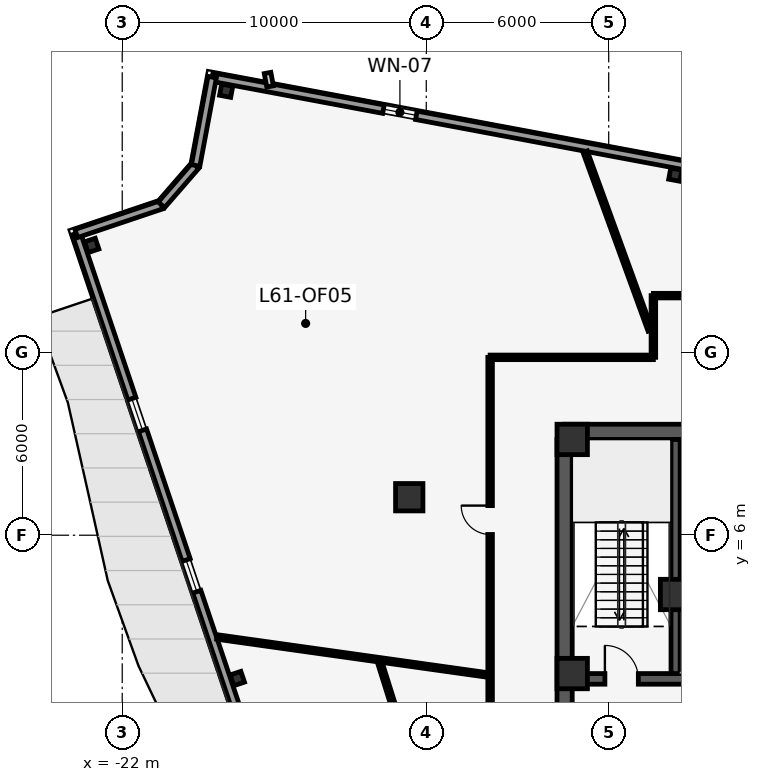
"""IFC4 building model, lengths in metres.
Left out: names, types, materials, properties, quantities, classifications, styles, units other than length and angle.
Written with IfcOpenShell. Run it as: python <this file> out.ifc"""

import sys

from ifc_helpers import new_model, si_unit, direction, frame, frame_2d, origin, origin_2d, place, context, subcontext, project, spatial, rectangle, i_section, extrude, element, fill, save


model = new_model("IFC4")
c1 = context("Model", 3, precision=1e-05, world=origin(), true_north=direction((0.0, 1.0)))
c2 = subcontext(c1, "Body", "Model", "MODEL_VIEW")
j1 = project(units=[si_unit("LENGTHUNIT", "METRE"), si_unit("PLANEANGLEUNIT", "RADIAN")], contexts=[c1])
p1 = place(None, origin())
s1 = spatial("IfcSite", under=j1, at=p1, CompositionType="ELEMENT")
p2 = place(p1, origin())
s2 = spatial("IfcBuilding", under=s1, at=p2, CompositionType="ELEMENT")
p3 = place(p2, frame((0.0, 0.0, 260.9)))
s3 = spatial("IfcBuildingStorey", under=s2, at=p3, CompositionType="ELEMENT", Elevation=260.9)
p4 = place(p3, frame((-7.45, 9.4, 0.0), z_axis=(0.0, 0.0, 1.0), x_axis=(1.0, 0.0, 0.0)))
e1 = element("IfcWall", 1, at=p4, inside=s3, PredefinedType="SHEAR", context=c2, shape_type="SweptSolid", body=[
    extrude(rectangle(XDim=14.9, YDim=0.5, at=frame_2d((7.45, 0.0))), origin(), (0.0, 0.0, 1.0), 4.35),
])
p5 = place(p4, frame((6.9, 0.0, 0.0)))
e2 = element("IfcOpeningElement", 2, at=p5, cuts=e1, PredefinedType="OPENING", context=c2, shape_type="SweptSolid", body=[
    extrude(rectangle(XDim=1.1, YDim=2.15, at=frame_2d((0.55, 1.075))), frame((0.0, 0.26, 0.0), z_axis=(0.0, -1.0, 0.0), x_axis=(1.0, 0.0, 0.0)), (0.0, 0.0, 1.0), 0.52),
])
p6 = place(p4, frame((4.23, 0.0, 0.0)))
e3 = element("IfcOpeningElement", 3, at=p6, cuts=e1, PredefinedType="OPENING", context=c2, shape_type="SweptSolid", body=[
    extrude(rectangle(XDim=0.88, YDim=2.15, at=frame_2d((0.44, 1.075))), frame((0.0, 0.26, 0.0), z_axis=(0.0, -1.0, 0.0), x_axis=(1.0, 0.0, 0.0)), (0.0, 0.0, 1.0), 0.52),
])
p7 = place(p4, frame((9.79, 0.0, 0.0)))
e4 = element("IfcOpeningElement", 4, at=p7, cuts=e1, PredefinedType="OPENING", context=c2, shape_type="SweptSolid", body=[
    extrude(rectangle(XDim=0.88, YDim=2.15, at=frame_2d((0.44, 1.075))), frame((0.0, 0.26, 0.0), z_axis=(0.0, -1.0, 0.0), x_axis=(1.0, 0.0, 0.0)), (0.0, 0.0, 1.0), 0.52),
])
p8 = place(p3, frame((-7.2, 1.275, 0.0), z_axis=(0.0, 0.0, 1.0), x_axis=(1.0, 0.0, 0.0)))
e5 = element("IfcWall", 5, at=p8, inside=s3, PredefinedType="SHEAR", context=c2, shape_type="SweptSolid", body=[
    extrude(rectangle(XDim=14.4, YDim=0.35, at=frame_2d((7.2, 0.0))), origin(), (0.0, 0.0, 1.0), 4.35),
])
p9 = place(p8, frame((3.795, 0.0, 0.0)))
e6 = element("IfcOpeningElement", 6, at=p9, cuts=e5, PredefinedType="OPENING", context=c2, shape_type="SweptSolid", body=[
    extrude(rectangle(XDim=1.25, YDim=2.25, at=frame_2d((0.625, 1.125))), frame((0.0, 0.185, 0.0), z_axis=(0.0, -1.0, 0.0), x_axis=(1.0, 0.0, 0.0)), (0.0, 0.0, 1.0), 0.37),
])
p10 = place(p8, frame((9.355, 0.0, 0.0)))
e7 = element("IfcOpeningElement", 7, at=p10, cuts=e5, PredefinedType="OPENING", context=c2, shape_type="SweptSolid", body=[
    extrude(rectangle(XDim=1.25, YDim=2.25, at=frame_2d((0.625, 1.125))), frame((0.0, 0.185, 0.0), z_axis=(0.0, -1.0, 0.0), x_axis=(1.0, 0.0, 0.0)), (0.0, 0.0, 1.0), 0.37),
])
p11 = place(p8, frame((1.075, 0.0, 0.0)))
e8 = element("IfcOpeningElement", 8, at=p11, cuts=e5, PredefinedType="OPENING", context=c2, shape_type="SweptSolid", body=[
    extrude(rectangle(XDim=1.1, YDim=2.15, at=frame_2d((0.55, 1.075))), frame((0.0, 0.185, 0.0), z_axis=(0.0, -1.0, 0.0), x_axis=(1.0, 0.0, 0.0)), (0.0, 0.0, 1.0), 0.37),
])
p12 = place(p8, frame((12.225, 0.0, 0.0)))
e9 = element("IfcOpeningElement", 9, at=p12, cuts=e5, PredefinedType="OPENING", context=c2, shape_type="SweptSolid", body=[
    extrude(rectangle(XDim=1.1, YDim=2.15, at=frame_2d((0.55, 1.075))), frame((0.0, 0.185, 0.0), z_axis=(0.0, -1.0, 0.0), x_axis=(1.0, 0.0, 0.0)), (0.0, 0.0, 1.0), 0.37),
])
p13 = place(p3, frame((-3.8, 1.45, 0.0), z_axis=(0.0, 0.0, 1.0), x_axis=(0.0, 1.0, 0.0)))
e10 = element("IfcWall", 10, at=p13, inside=s3, PredefinedType="SHEAR", context=c2, shape_type="SweptSolid", body=[
    extrude(rectangle(XDim=7.7, YDim=0.3, at=frame_2d((3.85, 0.0))), origin(), (0.0, 0.0, 1.0), 4.35),
])
p14 = place(p3, frame((-7.45, 0.1, 0.0), z_axis=(0.0, 0.0, 1.0), x_axis=(0.0, 1.0, 0.0)))
e11 = element("IfcWall", 11, at=p14, inside=s3, PredefinedType="SHEAR", context=c2, shape_type="SweptSolid", body=[
    extrude(rectangle(XDim=9.05, YDim=0.5, at=frame_2d((4.525, 0.0))), origin(), (0.0, 0.0, 1.0), 4.35),
])
for number, where, z_axis, x_axis in (
    (12, (-7.2, 9.15, 0.0), (0.0, 0.0, 1.0), (1.0, 0.0, 0.0)),
    (13, (-7.2, 1.45, 0.0), (0.0, 0.0, 1.0), (1.0, 0.0, 0.0)),
    (14, (-3.8, 4.05, 0.0), (0.0, 0.0, 1.0), (1.0, 0.0, 0.0)),
):
    element("IfcColumn", number, at=place(p3, frame(where, z_axis=z_axis, x_axis=x_axis)), inside=s3, PredefinedType="COLUMN", context=c2, shape_type="SweptSolid", body=[
        extrude(rectangle(XDim=1.0, YDim=1.0, at=origin_2d()), origin(), (0.0, 0.0, 1.0), 4.6),
    ])
p15 = place(p3, frame((-12.56, 7.25, 0.0), z_axis=(0.0, 0.0, 1.0), x_axis=(1.0, 0.0, 0.0)))
e15 = element("IfcColumn", 15, at=p15, inside=s3, PredefinedType="COLUMN", context=c2, shape_type="SweptSolid", body=[
    extrude(rectangle(XDim=0.9, YDim=0.9, at=origin_2d()), origin(), (0.0, 0.0, 1.0), 4.6),
])
for number, where, z_axis, x_axis in (
    (16, (-23.004, 15.531, 0.0), (0.0, 0.0, 1.0), (-0.319, 0.948, 0.0)),
    (17, (-18.215, 1.286, 0.0), (0.0, 0.0, 1.0), (-0.319, 0.948, 0.0)),
    (18, (-3.809, 17.859, 0.0), (0.0, 0.0, 1.0), (-0.983, 0.184, 0.0)),
    (19, (-18.582, 20.619, 0.0), (0.0, 0.0, 1.0), (-0.983, 0.184, 0.0)),
):
    element("IfcColumn", number, at=place(p3, frame(where, z_axis=z_axis, x_axis=x_axis)), inside=s3, PredefinedType="COLUMN", context=c2, shape_type="SweptSolid", body=[
        extrude(i_section(OverallWidth=0.373, OverallDepth=0.373, WebThickness=0.016, FlangeThickness=0.026, at=origin_2d()), origin(), (0.0, 0.0, 1.0), 4.6),
    ])
p16 = place(p3, frame((-19.042, 21.066, 0.0), z_axis=(0.0, 0.0, 1.0), x_axis=(0.982948140881, -0.183882985453, 0.0)))
e20 = element("IfcWall", 20, at=p16, inside=s3, PredefinedType="STANDARD", context=c2, shape_type="SweptSolid", body=[
    extrude(rectangle(XDim=46.163, YDim=0.28, at=frame_2d((23.081, 0.0))), origin(), (0.0, 0.0, 1.0), 4.35),
])
p17 = place(p16, frame((5.731, 0.0, 0.85)))
e21 = element("IfcOpeningElement", 21, at=p17, cuts=e20, PredefinedType="OPENING", context=c2, shape_type="SweptSolid", body=[
    extrude(rectangle(XDim=1.1, YDim=2.15, at=frame_2d((0.55, 1.075))), frame((0.0, 0.15, 0.0), z_axis=(0.0, -1.0, 0.0), x_axis=(1.0, 0.0, 0.0)), (0.0, 0.0, 1.0), 0.3),
])
p18 = place(p16, frame((33.731, 0.0, 0.85)))
e22 = element("IfcOpeningElement", 22, at=p18, cuts=e20, PredefinedType="OPENING", context=c2, shape_type="SweptSolid", body=[
    extrude(rectangle(XDim=1.1, YDim=2.15, at=frame_2d((0.55, 1.075))), frame((0.0, 0.15, 0.0), z_axis=(0.0, -1.0, 0.0), x_axis=(1.0, 0.0, 0.0)), (0.0, 0.0, 1.0), 0.3),
])
p19 = place(p16, frame((39.331, 0.0, 0.85)))
e23 = element("IfcOpeningElement", 23, at=p19, cuts=e20, PredefinedType="OPENING", context=c2, shape_type="SweptSolid", body=[
    extrude(rectangle(XDim=1.1, YDim=2.15, at=frame_2d((0.55, 1.075))), frame((0.0, 0.15, 0.0), z_axis=(0.0, -1.0, 0.0), x_axis=(1.0, 0.0, 0.0)), (0.0, 0.0, 1.0), 0.3),
])
p20 = place(p3, frame((-8.79, -27.828, 0.0), z_axis=(0.0, 0.0, 1.0), x_axis=(-0.318898365887, 0.947788917552, 0.0)))
e24 = element("IfcWall", 24, at=p20, inside=s3, PredefinedType="STANDARD", context=c2, shape_type="SweptSolid", body=[
    extrude(rectangle(XDim=46.163, YDim=0.28, at=frame_2d((23.081, 0.0))), origin(), (0.0, 0.0, 1.0), 4.35),
])
p21 = place(p20, frame((22.281, 0.0, 0.0)))
e25 = element("IfcOpeningElement", 25, at=p21, cuts=e24, PredefinedType="OPENING", context=c2, shape_type="SweptSolid", body=[
    extrude(rectangle(XDim=1.6, YDim=2.2, at=frame_2d((0.8, 1.1))), frame((0.0, 0.15, 0.0), z_axis=(0.0, -1.0, 0.0), x_axis=(1.0, 0.0, 0.0)), (0.0, 0.0, 1.0), 0.3),
])
p22 = place(p20, frame((5.731, 0.0, 0.85)))
e26 = element("IfcOpeningElement", 26, at=p22, cuts=e24, PredefinedType="OPENING", context=c2, shape_type="SweptSolid", body=[
    extrude(rectangle(XDim=1.1, YDim=2.15, at=frame_2d((0.55, 1.075))), frame((0.0, 0.15, 0.0), z_axis=(0.0, -1.0, 0.0), x_axis=(1.0, 0.0, 0.0)), (0.0, 0.0, 1.0), 0.3),
])
p23 = place(p20, frame((11.331, 0.0, 0.85)))
e27 = element("IfcOpeningElement", 27, at=p23, cuts=e24, PredefinedType="OPENING", context=c2, shape_type="SweptSolid", body=[
    extrude(rectangle(XDim=1.1, YDim=2.15, at=frame_2d((0.55, 1.075))), frame((0.0, 0.15, 0.0), z_axis=(0.0, -1.0, 0.0), x_axis=(1.0, 0.0, 0.0)), (0.0, 0.0, 1.0), 0.3),
])
p24 = place(p20, frame((33.731, 0.0, 0.85)))
e28 = element("IfcOpeningElement", 28, at=p24, cuts=e24, PredefinedType="OPENING", context=c2, shape_type="SweptSolid", body=[
    extrude(rectangle(XDim=1.1, YDim=2.15, at=frame_2d((0.55, 1.075))), frame((0.0, 0.15, 0.0), z_axis=(0.0, -1.0, 0.0), x_axis=(1.0, 0.0, 0.0)), (0.0, 0.0, 1.0), 0.3),
])
p25 = place(p20, frame((39.331, 0.0, 0.85)))
e29 = element("IfcOpeningElement", 29, at=p25, cuts=e24, PredefinedType="OPENING", context=c2, shape_type="SweptSolid", body=[
    extrude(rectangle(XDim=1.1, YDim=2.15, at=frame_2d((0.55, 1.075))), frame((0.0, 0.15, 0.0), z_axis=(0.0, -1.0, 0.0), x_axis=(1.0, 0.0, 0.0)), (0.0, 0.0, 1.0), 0.3),
])
p26 = place(p3, frame((-23.511, 15.924, 0.0), z_axis=(0.0, 0.0, 1.0), x_axis=(0.9478040536, 0.31885337693, 0.0)))
e30 = element("IfcWall", 30, at=p26, inside=s3, PredefinedType="STANDARD", context=c2, shape_type="SweptSolid", body=[
    extrude(rectangle(XDim=2.956, YDim=0.28, at=frame_2d((1.478, 0.0))), origin(), (0.0, 0.0, 1.0), 4.35),
])
p27 = place(p3, frame((-20.71, 16.867, 0.0), z_axis=(0.0, 0.0, 1.0), x_axis=(0.656062411204, 0.754706640096, 0.0)))
e31 = element("IfcWall", 31, at=p27, inside=s3, PredefinedType="STANDARD", context=c2, shape_type="SweptSolid", body=[
    extrude(rectangle(XDim=1.715, YDim=0.28, at=frame_2d((0.857, 0.0))), origin(), (0.0, 0.0, 1.0), 4.35),
])
p28 = place(p3, frame((-19.585, 18.161, 0.0), z_axis=(0.0, 0.0, 1.0), x_axis=(0.183869591509, 0.982950646431, 0.0)))
e32 = element("IfcWall", 32, at=p28, inside=s3, PredefinedType="STANDARD", context=c2, shape_type="SweptSolid", body=[
    extrude(rectangle(XDim=2.956, YDim=0.28, at=frame_2d((1.478, 0.0))), origin(), (0.0, 0.0, 1.0), 4.35),
])
p29 = place(p3, frame((-3.65, 4.05, 0.0), z_axis=(0.0, 0.0, 1.0), x_axis=(1.0, 0.0, 0.0)))
e33 = element("IfcWall", 33, at=p29, inside=s3, PredefinedType="PARTITIONING", context=c2, shape_type="SweptSolid", body=[
    extrude(rectangle(XDim=1.73, YDim=0.2, at=frame_2d((0.865, 0.0))), origin(), (0.0, 0.0, 1.0), 4.35),
])
p30 = place(p3, frame((-9.9, -11.7, 0.0), z_axis=(0.0, 0.0, 1.0), x_axis=(0.0, 1.0, 0.0)))
e34 = element("IfcWall", 34, at=p30, inside=s3, PredefinedType="PARTITIONING", context=c2, shape_type="SweptSolid", body=[
    extrude(rectangle(XDim=23.55, YDim=0.15, at=frame_2d((11.775, 0.0))), origin(), (0.0, 0.0, 1.0), 4.35),
])
p31 = place(p30, frame((6.736, 0.0, 0.0)))
e35 = element("IfcOpeningElement", 35, at=p31, cuts=e34, PredefinedType="OPENING", context=c2, shape_type="SweptSolid", body=[
    extrude(rectangle(XDim=0.95, YDim=2.15, at=frame_2d((0.475, 1.075))), frame((0.0, 0.085, 0.0), z_axis=(0.0, -1.0, 0.0), x_axis=(1.0, 0.0, 0.0)), (0.0, 0.0, 1.0), 0.17),
])
p32 = place(p30, frame((17.724, 0.0, 0.0)))
e36 = element("IfcOpeningElement", 36, at=p32, cuts=e34, PredefinedType="OPENING", context=c2, shape_type="SweptSolid", body=[
    extrude(rectangle(XDim=0.95, YDim=2.15, at=frame_2d((0.475, 1.075))), frame((0.0, 0.085, 0.0), z_axis=(0.0, -1.0, 0.0), x_axis=(1.0, 0.0, 0.0)), (0.0, 0.0, 1.0), 0.17),
])
p33 = place(p3, frame((-9.9, 11.85, 0.0), z_axis=(0.0, 0.0, 1.0), x_axis=(1.0, 0.0, 0.0)))
e37 = element("IfcWall", 37, at=p33, inside=s3, PredefinedType="PARTITIONING", context=c2, shape_type="SweptSolid", body=[
    extrude(rectangle(XDim=5.37, YDim=0.15, at=frame_2d((2.685, 0.0))), origin(), (0.0, 0.0, 1.0), 4.35),
])
p34 = place(p3, frame((-4.53, 11.85, 0.0), z_axis=(0.0, 0.0, 1.0), x_axis=(0.0, 1.0, 0.0)))
e38 = element("IfcWall", 38, at=p34, inside=s3, PredefinedType="PARTITIONING", context=c2, shape_type="SweptSolid", body=[
    extrude(rectangle(XDim=2.03, YDim=0.15, at=frame_2d((1.015, 0.0))), origin(), (0.0, 0.0, 1.0), 4.35),
])
p35 = place(p3, frame((-4.53, 13.88, 0.0), z_axis=(0.0, 0.0, 1.0), x_axis=(1.0, 0.0, 0.0)))
e39 = element("IfcWall", 39, at=p35, inside=s3, PredefinedType="PARTITIONING", context=c2, shape_type="SweptSolid", body=[
    extrude(rectangle(XDim=2.31, YDim=0.15, at=frame_2d((1.155, 0.0))), origin(), (0.0, 0.0, 1.0), 4.35),
])
p36 = place(p3, frame((-4.635, 12.735, 0.0), z_axis=(0.0, 0.0, 1.0), x_axis=(-0.34201562332, 0.939694265921, 0.0)))
e40 = element("IfcWall", 40, at=p36, inside=s3, PredefinedType="PARTITIONING", context=c2, shape_type="SweptSolid", body=[
    extrude(rectangle(XDim=6.257, YDim=0.15, at=frame_2d((3.128, 0.0))), origin(), (0.0, 0.0, 1.0), 4.35),
])
p37 = place(p3, frame((-10.005, 1.406, 0.0), z_axis=(0.0, 0.0, 1.0), x_axis=(-0.990266668464, 0.139183064089, 0.0)))
e41 = element("IfcWall", 41, at=p37, inside=s3, PredefinedType="PARTITIONING", context=c2, shape_type="SweptSolid", body=[
    extrude(rectangle(XDim=8.965, YDim=0.15, at=frame_2d((4.482, 0.0))), origin(), (0.0, 0.0, 1.0), 4.35),
])
p38 = place(p3, frame((-13.549, 1.879, 0.0), z_axis=(0.0, 0.0, 1.0), x_axis=(0.300333532513, -0.953834246213, 0.0)))
e42 = element("IfcWall", 42, at=p38, inside=s3, PredefinedType="PARTITIONING", context=c2, shape_type="SweptSolid", body=[
    extrude(rectangle(XDim=12.084, YDim=0.15, at=frame_2d((6.042, 0.0))), origin(), (0.0, 0.0, 1.0), 4.35),
])
p39 = place(p38, frame((5.567, 0.0, 0.0)))
e43 = element("IfcOpeningElement", 43, at=p39, cuts=e42, PredefinedType="OPENING", context=c2, shape_type="SweptSolid", body=[
    extrude(rectangle(XDim=0.95, YDim=2.15, at=frame_2d((0.475, 1.075))), frame((0.0, 0.085, 0.0), z_axis=(0.0, -1.0, 0.0), x_axis=(1.0, 0.0, 0.0)), (0.0, 0.0, 1.0), 0.17),
])
p40 = place(p17, origin())
e44 = element("IfcWindow", 44, at=p40, inside=s3, PartitioningType="SINGLE_PANEL", PredefinedType="WINDOW", context=c2, shape_type="SweptSolid", body=[
    extrude(rectangle(XDim=1.1, YDim=2.15, at=frame_2d((0.55, 1.075))), frame((0.0, 0.03, 0.0), z_axis=(0.0, -1.0, 0.0), x_axis=(1.0, 0.0, 0.0)), (0.0, 0.0, 1.0), 0.06),
])
fill(e21, e44)
p41 = place(p24, origin())
e45 = element("IfcWindow", 45, at=p41, inside=s3, PartitioningType="SINGLE_PANEL", PredefinedType="WINDOW", context=c2, shape_type="SweptSolid", body=[
    extrude(rectangle(XDim=1.1, YDim=2.15, at=frame_2d((0.55, 1.075))), frame((0.0, 0.03, 0.0), z_axis=(0.0, -1.0, 0.0), x_axis=(1.0, 0.0, 0.0)), (0.0, 0.0, 1.0), 0.06),
])
fill(e28, e45)
p42 = place(p25, origin())
e46 = element("IfcWindow", 46, at=p42, inside=s3, PartitioningType="SINGLE_PANEL", PredefinedType="WINDOW", context=c2, shape_type="SweptSolid", body=[
    extrude(rectangle(XDim=1.1, YDim=2.15, at=frame_2d((0.55, 1.075))), frame((0.0, 0.03, 0.0), z_axis=(0.0, -1.0, 0.0), x_axis=(1.0, 0.0, 0.0)), (0.0, 0.0, 1.0), 0.06),
])
fill(e29, e46)
p43 = place(p11, origin())
e47 = element("IfcDoor", 47, at=p43, inside=s3, OperationType="SINGLE_SWING_LEFT", PredefinedType="DOOR", context=c2, shape_type="SweptSolid", body=[
    extrude(rectangle(XDim=1.1, YDim=2.15, at=frame_2d((0.55, 1.075))), frame((0.0, 0.025, 0.0), z_axis=(0.0, -1.0, 0.0), x_axis=(1.0, 0.0, 0.0)), (0.0, 0.0, 1.0), 0.05),
])
fill(e8, e47)
p44 = place(p32, origin())
e48 = element("IfcDoor", 48, at=p44, inside=s3, OperationType="SINGLE_SWING_RIGHT", PredefinedType="DOOR", context=c2, shape_type="SweptSolid", body=[
    extrude(rectangle(XDim=0.95, YDim=2.15, at=frame_2d((0.475, 1.075))), frame((0.0, 0.025, 0.0), z_axis=(0.0, -1.0, 0.0), x_axis=(1.0, 0.0, 0.0)), (0.0, 0.0, 1.0), 0.05),
])
fill(e36, e48)
save(model, sys.argv[1])
